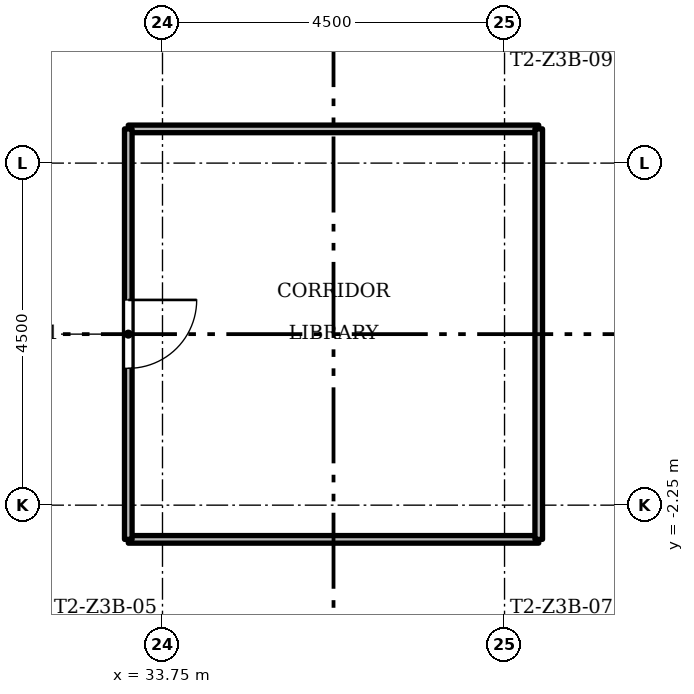
"""IFC4 building model, lengths in metres.
Left out: names, types, materials, properties, quantities, classifications, styles, units other than length and angle.
Written with IfcOpenShell. Run it as: python <this file> out.ifc"""

import sys

from ifc_helpers import new_model, si_unit, direction, frame, frame_2d, origin, place, context, subcontext, project, spatial, rectangle, extrude, element, fill, save


model = new_model("IFC4")
c1 = context("Model", 3, precision=1e-05, world=origin(), true_north=direction((0.0, 1.0)))
c2 = subcontext(c1, "Body", "Model", "MODEL_VIEW")
j1 = project(units=[si_unit("LENGTHUNIT", "METRE"), si_unit("PLANEANGLEUNIT", "RADIAN")], contexts=[c1])
p1 = place(None, origin())
s1 = spatial("IfcSite", under=j1, at=p1, CompositionType="ELEMENT")
p2 = place(p1, origin())
s2 = spatial("IfcBuilding", under=s1, at=p2, CompositionType="ELEMENT")
p3 = place(p2, frame((0.0, 0.0, 147.3)))
s3 = spatial("IfcBuildingStorey", under=s2, at=p3, CompositionType="ELEMENT", Elevation=147.3)
for number, where, z_axis, x_axis in (
    (1, (38.7, -2.7, 0.0), (0.0, 0.0, 1.0), (-1.0, 0.0, 0.0)),
    (2, (38.7, 2.7, 0.0), (0.0, 0.0, 1.0), (-1.0, 0.0, 0.0)),
    (3, (38.7, -2.7, 0.0), (0.0, 0.0, 1.0), (0.0, 1.0, 0.0)),
):
    element("IfcWall", number, at=place(p3, frame(where, z_axis=z_axis, x_axis=x_axis)), inside=s3, PredefinedType="PARTITIONING", context=c2, shape_type="SweptSolid", body=[
        extrude(rectangle(XDim=5.4, YDim=0.1, at=frame_2d((2.7, 0.0))), origin(), (0.0, 0.0, 1.0), 3.0),
    ])
p4 = place(p3, frame((33.3, -2.7, 0.0), z_axis=(0.0, 0.0, 1.0), x_axis=(0.0, 1.0, 0.0)))
e4 = element("IfcWall", 4, at=p4, inside=s3, PredefinedType="PARTITIONING", context=c2, shape_type="SweptSolid", body=[
    extrude(rectangle(XDim=5.4, YDim=0.1, at=frame_2d((2.7, 0.0))), origin(), (0.0, 0.0, 1.0), 3.0),
])
p5 = place(p4, frame((2.25, 0.0, 0.0)))
e5 = element("IfcOpeningElement", 5, at=p5, cuts=e4, PredefinedType="OPENING", context=c2, shape_type="SweptSolid", body=[
    extrude(rectangle(XDim=0.9, YDim=2.1, at=frame_2d((0.45, 1.05))), frame((0.0, 0.06, 0.0), z_axis=(0.0, -1.0, 0.0), x_axis=(1.0, 0.0, 0.0)), (0.0, 0.0, 1.0), 0.12),
])
p6 = place(p5, origin())
e6 = element("IfcDoor", 6, at=p6, inside=s3, OperationType="SINGLE_SWING_RIGHT", PredefinedType="DOOR", context=c2, shape_type="SweptSolid", body=[
    extrude(rectangle(XDim=0.9, YDim=2.1, at=frame_2d((0.45, 1.05))), frame((0.0, 0.025, 0.0), z_axis=(0.0, -1.0, 0.0), x_axis=(1.0, 0.0, 0.0)), (0.0, 0.0, 1.0), 0.05),
])
fill(e5, e6)
save(model, sys.argv[1])
